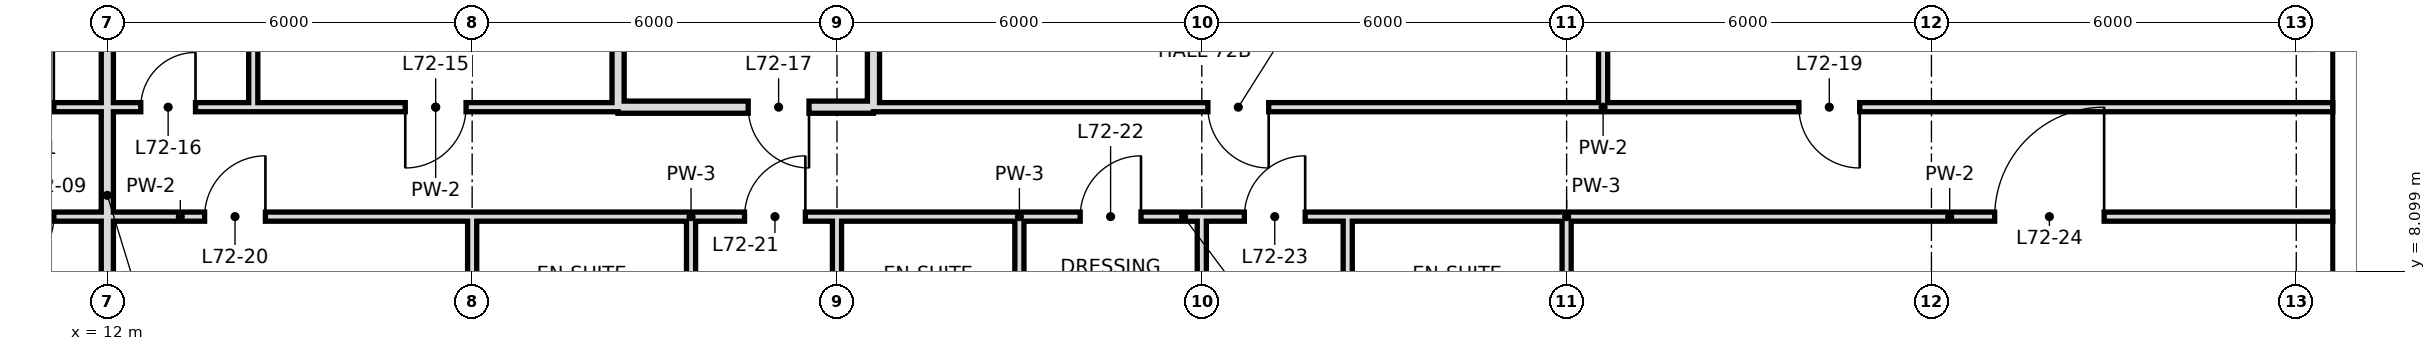
"""IFC4 building model, lengths in metres.
Left out: names, types, materials, properties, quantities, classifications, styles, units other than length and angle.
Written with IfcOpenShell. Run it as: python <this file> out.ifc"""

import sys

from ifc_helpers import new_model, si_unit, direction, frame, frame_2d, origin, place, context, subcontext, project, spatial, rectangle, extrude, element, fill, save


model = new_model("IFC4")
c1 = context("Model", 3, precision=1e-05, world=origin(), true_north=direction((0.0, 1.0)))
c2 = subcontext(c1, "Body", "Model", "MODEL_VIEW")
j1 = project(units=[si_unit("LENGTHUNIT", "METRE"), si_unit("PLANEANGLEUNIT", "RADIAN")], contexts=[c1])
p1 = place(None, origin())
s1 = spatial("IfcSite", under=j1, at=p1, CompositionType="ELEMENT")
p2 = place(p1, origin())
s2 = spatial("IfcBuilding", under=s1, at=p2, CompositionType="ELEMENT")
p3 = place(p2, frame((0.0, 0.0, 305.2)))
s3 = spatial("IfcBuildingStorey", under=s2, at=p3, CompositionType="ELEMENT", Elevation=305.2)
p4 = place(p3, frame((12.0, 0.0, 0.0), z_axis=(0.0, 0.0, 1.0), x_axis=(0.0, 1.0, 0.0)))
e1 = element("IfcWall", 1, at=p4, inside=s3, PredefinedType="SOLIDWALL", context=c2, shape_type="SweptSolid", body=[
    extrude(rectangle(XDim=18.7, YDim=0.2, at=frame_2d((9.35, 0.0))), origin(), (0.0, 0.0, 1.0), 2.72),
])
p5 = place(p3, frame((14.4, 10.8, 0.0), z_axis=(0.0, 0.0, 1.0), x_axis=(0.0, 1.0, 0.0)))
e2 = element("IfcWall", 2, at=p5, inside=s3, PredefinedType="PARTITIONING", context=c2, shape_type="SweptSolid", body=[
    extrude(rectangle(XDim=7.9, YDim=0.15, at=frame_2d((3.95, 0.0))), origin(), (0.0, 0.0, 1.0), 3.42),
])
p6 = place(p3, frame((18.0, 6.0, 0.0), z_axis=(0.0, 0.0, 1.0), x_axis=(0.0, 1.0, 0.0)))
e3 = element("IfcWall", 3, at=p6, inside=s3, PredefinedType="PARTITIONING", context=c2, shape_type="SweptSolid", body=[
    extrude(rectangle(XDim=3.0, YDim=0.15, at=frame_2d((1.5, 0.0))), origin(), (0.0, 0.0, 1.0), 2.72),
])
p7 = place(p3, frame((20.4, 10.8, 0.0), z_axis=(0.0, 0.0, 1.0), x_axis=(0.0, 1.0, 0.0)))
e4 = element("IfcWall", 4, at=p7, inside=s3, PredefinedType="SOLIDWALL", context=c2, shape_type="SweptSolid", body=[
    extrude(rectangle(XDim=7.9, YDim=0.2, at=frame_2d((3.95, 0.0))), origin(), (0.0, 0.0, 1.0), 2.72),
])
p8 = place(p3, frame((21.6, 6.0, 0.0), z_axis=(0.0, 0.0, 1.0), x_axis=(0.0, 1.0, 0.0)))
e5 = element("IfcWall", 5, at=p8, inside=s3, PredefinedType="PARTITIONING", context=c2, shape_type="SweptSolid", body=[
    extrude(rectangle(XDim=3.0, YDim=0.15, at=frame_2d((1.5, 0.0))), origin(), (0.0, 0.0, 1.0), 3.42),
])
p9 = place(p3, frame((24.0, 6.0, 0.0), z_axis=(0.0, 0.0, 1.0), x_axis=(0.0, 1.0, 0.0)))
e6 = element("IfcWall", 6, at=p9, inside=s3, PredefinedType="PARTITIONING", context=c2, shape_type="SweptSolid", body=[
    extrude(rectangle(XDim=3.0, YDim=0.15, at=frame_2d((1.5, 0.0))), origin(), (0.0, 0.0, 1.0), 2.72),
])
p10 = place(p3, frame((24.6, 10.8, 0.0), z_axis=(0.0, 0.0, 1.0), x_axis=(0.0, 1.0, 0.0)))
e7 = element("IfcWall", 7, at=p10, inside=s3, PredefinedType="SOLIDWALL", context=c2, shape_type="SweptSolid", body=[
    extrude(rectangle(XDim=7.9, YDim=0.2, at=frame_2d((3.95, 0.0))), origin(), (0.0, 0.0, 1.0), 2.72),
])
p11 = place(p3, frame((27.0, 6.0, 0.0), z_axis=(0.0, 0.0, 1.0), x_axis=(0.0, 1.0, 0.0)))
e8 = element("IfcWall", 8, at=p11, inside=s3, PredefinedType="PARTITIONING", context=c2, shape_type="SweptSolid", body=[
    extrude(rectangle(XDim=3.0, YDim=0.15, at=frame_2d((1.5, 0.0))), origin(), (0.0, 0.0, 1.0), 3.42),
])
p12 = place(p3, frame((30.0, -0.6, 0.0), z_axis=(0.0, 0.0, 1.0), x_axis=(0.0, 1.0, 0.0)))
e9 = element("IfcWall", 9, at=p12, inside=s3, PredefinedType="PARTITIONING", context=c2, shape_type="SweptSolid", body=[
    extrude(rectangle(XDim=9.6, YDim=0.15, at=frame_2d((4.8, 0.0))), origin(), (0.0, 0.0, 1.0), 2.72),
])
p13 = place(p3, frame((32.4, 6.0, 0.0), z_axis=(0.0, 0.0, 1.0), x_axis=(0.0, 1.0, 0.0)))
e10 = element("IfcWall", 10, at=p13, inside=s3, PredefinedType="PARTITIONING", context=c2, shape_type="SweptSolid", body=[
    extrude(rectangle(XDim=3.0, YDim=0.15, at=frame_2d((1.5, 0.0))), origin(), (0.0, 0.0, 1.0), 3.42),
])
p14 = place(p3, frame((36.0, 6.0, 0.0), z_axis=(0.0, 0.0, 1.0), x_axis=(0.0, 1.0, 0.0)))
e11 = element("IfcWall", 11, at=p14, inside=s3, PredefinedType="PARTITIONING", context=c2, shape_type="SweptSolid", body=[
    extrude(rectangle(XDim=3.0, YDim=0.15, at=frame_2d((1.5, 0.0))), origin(), (0.0, 0.0, 1.0), 2.72),
])
p15 = place(p3, frame((36.6, 10.8, 0.0), z_axis=(0.0, 0.0, 1.0), x_axis=(0.0, 1.0, 0.0)))
e12 = element("IfcWall", 12, at=p15, inside=s3, PredefinedType="PARTITIONING", context=c2, shape_type="SweptSolid", body=[
    extrude(rectangle(XDim=7.9, YDim=0.15, at=frame_2d((3.95, 0.0))), origin(), (0.0, 0.0, 1.0), 3.42),
])
p16 = place(p3, frame((20.4, 10.8, 0.0), z_axis=(0.0, 0.0, 1.0), x_axis=(1.0, 0.0, 0.0)))
e13 = element("IfcWall", 13, at=p16, inside=s3, PredefinedType="SOLIDWALL", context=c2, shape_type="SweptSolid", body=[
    extrude(rectangle(XDim=4.2, YDim=0.2, at=frame_2d((2.1, 0.0))), origin(), (0.0, 0.0, 1.0), 2.72),
])
p17 = place(p16, frame((2.14, 0.0, 0.0)))
e14 = element("IfcOpeningElement", 14, at=p17, cuts=e13, PredefinedType="OPENING", context=c2, shape_type="SweptSolid", body=[
    extrude(rectangle(XDim=1.0, YDim=2.4, at=frame_2d((0.5, 1.2))), frame((0.0, 0.11, 0.0), z_axis=(0.0, -1.0, 0.0), x_axis=(1.0, 0.0, 0.0)), (0.0, 0.0, 1.0), 0.22),
])
p18 = place(p3, frame((-10.2, 10.8, 0.0), z_axis=(0.0, 0.0, 1.0), x_axis=(1.0, 0.0, 0.0)))
e15 = element("IfcWall", 15, at=p18, inside=s3, PredefinedType="PARTITIONING", context=c2, shape_type="SweptSolid", body=[
    extrude(rectangle(XDim=22.2, YDim=0.15, at=frame_2d((11.1, 0.0))), origin(), (0.0, 0.0, 1.0), 3.42),
])
p19 = place(p18, frame((20.32, 0.0, 0.0)))
e16 = element("IfcOpeningElement", 16, at=p19, cuts=e15, PredefinedType="OPENING", context=c2, shape_type="SweptSolid", body=[
    extrude(rectangle(XDim=1.0, YDim=2.4, at=frame_2d((0.5, 1.2))), frame((0.0, 0.085, 0.0), z_axis=(0.0, -1.0, 0.0), x_axis=(1.0, 0.0, 0.0)), (0.0, 0.0, 1.0), 0.17),
])
p20 = place(p18, frame((3.4, 0.0, 0.0)))
e17 = element("IfcOpeningElement", 17, at=p20, cuts=e15, PredefinedType="OPENING", context=c2, shape_type="SweptSolid", body=[
    extrude(rectangle(XDim=1.0, YDim=2.4, at=frame_2d((0.5, 1.2))), frame((0.0, 0.085, 0.0), z_axis=(0.0, -1.0, 0.0), x_axis=(1.0, 0.0, 0.0)), (0.0, 0.0, 1.0), 0.17),
])
p21 = place(p18, frame((10.84, 0.0, 0.0)))
e18 = element("IfcOpeningElement", 18, at=p21, cuts=e15, PredefinedType="OPENING", context=c2, shape_type="SweptSolid", body=[
    extrude(rectangle(XDim=1.0, YDim=2.4, at=frame_2d((0.5, 1.2))), frame((0.0, 0.085, 0.0), z_axis=(0.0, -1.0, 0.0), x_axis=(1.0, 0.0, 0.0)), (0.0, 0.0, 1.0), 0.17),
])
p22 = place(p3, frame((14.4, 10.8, 0.0), z_axis=(0.0, 0.0, 1.0), x_axis=(1.0, 0.0, 0.0)))
e19 = element("IfcWall", 19, at=p22, inside=s3, PredefinedType="PARTITIONING", context=c2, shape_type="SweptSolid", body=[
    extrude(rectangle(XDim=6.0, YDim=0.15, at=frame_2d((3.0, 0.0))), origin(), (0.0, 0.0, 1.0), 3.42),
])
p23 = place(p22, frame((2.5, 0.0, 0.0)))
e20 = element("IfcOpeningElement", 20, at=p23, cuts=e19, PredefinedType="OPENING", context=c2, shape_type="SweptSolid", body=[
    extrude(rectangle(XDim=1.0, YDim=2.4, at=frame_2d((0.5, 1.2))), frame((0.0, 0.085, 0.0), z_axis=(0.0, -1.0, 0.0), x_axis=(1.0, 0.0, 0.0)), (0.0, 0.0, 1.0), 0.17),
])
p24 = place(p3, frame((24.6, 10.8, 0.0), z_axis=(0.0, 0.0, 1.0), x_axis=(1.0, 0.0, 0.0)))
e21 = element("IfcWall", 21, at=p24, inside=s3, PredefinedType="PARTITIONING", context=c2, shape_type="SweptSolid", body=[
    extrude(rectangle(XDim=24.0, YDim=0.15, at=frame_2d((12.0, 0.0))), origin(), (0.0, 0.0, 1.0), 3.42),
])
p25 = place(p24, frame((5.5, 0.0, 0.0)))
e22 = element("IfcOpeningElement", 22, at=p25, cuts=e21, PredefinedType="OPENING", context=c2, shape_type="SweptSolid", body=[
    extrude(rectangle(XDim=1.0, YDim=2.4, at=frame_2d((0.5, 1.2))), frame((0.0, 0.085, 0.0), z_axis=(0.0, -1.0, 0.0), x_axis=(1.0, 0.0, 0.0)), (0.0, 0.0, 1.0), 0.17),
])
p26 = place(p24, frame((15.22, 0.0, 0.0)))
e23 = element("IfcOpeningElement", 23, at=p26, cuts=e21, PredefinedType="OPENING", context=c2, shape_type="SweptSolid", body=[
    extrude(rectangle(XDim=1.0, YDim=2.4, at=frame_2d((0.5, 1.2))), frame((0.0, 0.085, 0.0), z_axis=(0.0, -1.0, 0.0), x_axis=(1.0, 0.0, 0.0)), (0.0, 0.0, 1.0), 0.17),
])
p27 = place(p3, frame((12.0, 10.8, 0.0), z_axis=(0.0, 0.0, 1.0), x_axis=(1.0, 0.0, 0.0)))
e24 = element("IfcWall", 24, at=p27, inside=s3, PredefinedType="PARTITIONING", context=c2, shape_type="SweptSolid", body=[
    extrude(rectangle(XDim=2.4, YDim=0.15, at=frame_2d((1.2, 0.0))), origin(), (0.0, 0.0, 1.0), 3.42),
])
p28 = place(p27, frame((0.55, 0.0, 0.0)))
e25 = element("IfcOpeningElement", 25, at=p28, cuts=e24, PredefinedType="OPENING", context=c2, shape_type="SweptSolid", body=[
    extrude(rectangle(XDim=0.9, YDim=2.4, at=frame_2d((0.45, 1.2))), frame((0.0, 0.085, 0.0), z_axis=(0.0, -1.0, 0.0), x_axis=(1.0, 0.0, 0.0)), (0.0, 0.0, 1.0), 0.17),
])
p29 = place(p3, frame((8.4, 9.0, 0.0), z_axis=(0.0, 0.0, 1.0), x_axis=(1.0, 0.0, 0.0)))
e26 = element("IfcWall", 26, at=p29, inside=s3, PredefinedType="PARTITIONING", context=c2, shape_type="SweptSolid", body=[
    extrude(rectangle(XDim=9.6, YDim=0.15, at=frame_2d((4.8, 0.0))), origin(), (0.0, 0.0, 1.0), 3.42),
])
p30 = place(p29, frame((1.72, 0.0, 0.0)))
e27 = element("IfcOpeningElement", 27, at=p30, cuts=e26, PredefinedType="OPENING", context=c2, shape_type="SweptSolid", body=[
    extrude(rectangle(XDim=1.0, YDim=2.4, at=frame_2d((0.5, 1.2))), frame((0.0, 0.085, 0.0), z_axis=(0.0, -1.0, 0.0), x_axis=(1.0, 0.0, 0.0)), (0.0, 0.0, 1.0), 0.17),
])
p31 = place(p29, frame((5.2, 0.0, 0.0)))
e28 = element("IfcOpeningElement", 28, at=p31, cuts=e26, PredefinedType="OPENING", context=c2, shape_type="SweptSolid", body=[
    extrude(rectangle(XDim=1.0, YDim=2.4, at=frame_2d((0.5, 1.2))), frame((0.0, 0.085, 0.0), z_axis=(0.0, -1.0, 0.0), x_axis=(1.0, 0.0, 0.0)), (0.0, 0.0, 1.0), 0.17),
])
p32 = place(p3, frame((21.6, 9.0, 0.0), z_axis=(0.0, 0.0, 1.0), x_axis=(1.0, 0.0, 0.0)))
e29 = element("IfcWall", 29, at=p32, inside=s3, PredefinedType="PARTITIONING", context=c2, shape_type="SweptSolid", body=[
    extrude(rectangle(XDim=2.4, YDim=0.15, at=frame_2d((1.2, 0.0))), origin(), (0.0, 0.0, 1.0), 3.42),
])
p33 = place(p32, frame((0.88, 0.0, 0.0)))
e30 = element("IfcOpeningElement", 30, at=p33, cuts=e29, PredefinedType="OPENING", context=c2, shape_type="SweptSolid", body=[
    extrude(rectangle(XDim=1.0, YDim=2.4, at=frame_2d((0.5, 1.2))), frame((0.0, 0.085, 0.0), z_axis=(0.0, -1.0, 0.0), x_axis=(1.0, 0.0, 0.0)), (0.0, 0.0, 1.0), 0.17),
])
p34 = place(p3, frame((27.0, 9.0, 0.0), z_axis=(0.0, 0.0, 1.0), x_axis=(1.0, 0.0, 0.0)))
e31 = element("IfcWall", 31, at=p34, inside=s3, PredefinedType="PARTITIONING", context=c2, shape_type="SweptSolid", body=[
    extrude(rectangle(XDim=5.4, YDim=0.15, at=frame_2d((2.7, 0.0))), origin(), (0.0, 0.0, 1.0), 3.42),
])
p35 = place(p34, frame((1.0, 0.0, 0.0)))
e32 = element("IfcOpeningElement", 32, at=p35, cuts=e31, PredefinedType="OPENING", context=c2, shape_type="SweptSolid", body=[
    extrude(rectangle(XDim=1.0, YDim=2.4, at=frame_2d((0.5, 1.2))), frame((0.0, 0.085, 0.0), z_axis=(0.0, -1.0, 0.0), x_axis=(1.0, 0.0, 0.0)), (0.0, 0.0, 1.0), 0.17),
])
p36 = place(p34, frame((3.7, 0.0, 0.0)))
e33 = element("IfcOpeningElement", 33, at=p36, cuts=e31, PredefinedType="OPENING", context=c2, shape_type="SweptSolid", body=[
    extrude(rectangle(XDim=1.0, YDim=2.4, at=frame_2d((0.5, 1.2))), frame((0.0, 0.085, 0.0), z_axis=(0.0, -1.0, 0.0), x_axis=(1.0, 0.0, 0.0)), (0.0, 0.0, 1.0), 0.17),
])
p37 = place(p3, frame((36.0, 9.0, 0.0), z_axis=(0.0, 0.0, 1.0), x_axis=(1.0, 0.0, 0.0)))
e34 = element("IfcWall", 34, at=p37, inside=s3, PredefinedType="PARTITIONING", context=c2, shape_type="SweptSolid", body=[
    extrude(rectangle(XDim=12.6, YDim=0.15, at=frame_2d((6.3, 0.0))), origin(), (0.0, 0.0, 1.0), 3.42),
])
p38 = place(p37, frame((7.04, 0.0, 0.0)))
e35 = element("IfcOpeningElement", 35, at=p38, cuts=e34, PredefinedType="OPENING", context=c2, shape_type="SweptSolid", body=[
    extrude(rectangle(XDim=1.8, YDim=2.4, at=frame_2d((0.9, 1.2))), frame((0.0, 0.085, 0.0), z_axis=(0.0, -1.0, 0.0), x_axis=(1.0, 0.0, 0.0)), (0.0, 0.0, 1.0), 0.17),
])
p39 = place(p3, frame((18.0, 9.0, 0.0), z_axis=(0.0, 0.0, 1.0), x_axis=(1.0, 0.0, 0.0)))
e36 = element("IfcWall", 36, at=p39, inside=s3, PredefinedType="PARTITIONING", context=c2, shape_type="SweptSolid", body=[
    extrude(rectangle(XDim=3.6, YDim=0.15, at=frame_2d((1.8, 0.0))), origin(), (0.0, 0.0, 1.0), 3.42),
])
p40 = place(p3, frame((24.0, 9.0, 0.0), z_axis=(0.0, 0.0, 1.0), x_axis=(1.0, 0.0, 0.0)))
e37 = element("IfcWall", 37, at=p40, inside=s3, PredefinedType="PARTITIONING", context=c2, shape_type="SweptSolid", body=[
    extrude(rectangle(XDim=3.0, YDim=0.15, at=frame_2d((1.5, 0.0))), origin(), (0.0, 0.0, 1.0), 3.42),
])
p41 = place(p3, frame((32.4, 9.0, 0.0), z_axis=(0.0, 0.0, 1.0), x_axis=(1.0, 0.0, 0.0)))
e38 = element("IfcWall", 38, at=p41, inside=s3, PredefinedType="PARTITIONING", context=c2, shape_type="SweptSolid", body=[
    extrude(rectangle(XDim=3.6, YDim=0.15, at=frame_2d((1.8, 0.0))), origin(), (0.0, 0.0, 1.0), 3.42),
])
p42 = place(p19, frame((1.0, 0.0, 0.0), z_axis=(0.0, 0.0, 1.0), x_axis=(-1.0, 0.0, 0.0)))
e39 = element("IfcDoor", 39, at=p42, inside=s3, OperationType="SINGLE_SWING_LEFT", PredefinedType="DOOR", context=c2, shape_type="SweptSolid", body=[
    extrude(rectangle(XDim=1.0, YDim=2.4, at=frame_2d((0.5, 1.2))), frame((0.0, 0.025, 0.0), z_axis=(0.0, -1.0, 0.0), x_axis=(1.0, 0.0, 0.0)), (0.0, 0.0, 1.0), 0.05),
])
fill(e16, e39)
p43 = place(p30, frame((1.0, 0.0, 0.0), z_axis=(0.0, 0.0, 1.0), x_axis=(-1.0, 0.0, 0.0)))
e40 = element("IfcDoor", 40, at=p43, inside=s3, OperationType="SINGLE_SWING_RIGHT", PredefinedType="DOOR", context=c2, shape_type="SweptSolid", body=[
    extrude(rectangle(XDim=1.0, YDim=2.4, at=frame_2d((0.5, 1.2))), frame((0.0, 0.025, 0.0), z_axis=(0.0, -1.0, 0.0), x_axis=(1.0, 0.0, 0.0)), (0.0, 0.0, 1.0), 0.05),
])
fill(e27, e40)
p44 = place(p23, frame((1.0, 0.0, 0.0), z_axis=(0.0, 0.0, 1.0), x_axis=(-1.0, 0.0, 0.0)))
e41 = element("IfcDoor", 41, at=p44, inside=s3, OperationType="SINGLE_SWING_RIGHT", PredefinedType="DOOR", context=c2, shape_type="SweptSolid", body=[
    extrude(rectangle(XDim=1.0, YDim=2.4, at=frame_2d((0.5, 1.2))), frame((0.0, 0.025, 0.0), z_axis=(0.0, -1.0, 0.0), x_axis=(1.0, 0.0, 0.0)), (0.0, 0.0, 1.0), 0.05),
])
fill(e20, e41)
p45 = place(p28, frame((0.9, 0.0, 0.0), z_axis=(0.0, 0.0, 1.0), x_axis=(-1.0, 0.0, 0.0)))
e42 = element("IfcDoor", 42, at=p45, inside=s3, OperationType="SINGLE_SWING_LEFT", PredefinedType="DOOR", context=c2, shape_type="SweptSolid", body=[
    extrude(rectangle(XDim=0.9, YDim=2.4, at=frame_2d((0.45, 1.2))), frame((0.0, 0.025, 0.0), z_axis=(0.0, -1.0, 0.0), x_axis=(1.0, 0.0, 0.0)), (0.0, 0.0, 1.0), 0.05),
])
fill(e25, e42)
p46 = place(p17, origin())
e43 = element("IfcDoor", 43, at=p46, inside=s3, OperationType="SINGLE_SWING_RIGHT", PredefinedType="DOOR", context=c2, shape_type="SweptSolid", body=[
    extrude(rectangle(XDim=1.0, YDim=2.4, at=frame_2d((0.5, 1.2))), frame((0.0, 0.025, 0.0), z_axis=(0.0, -1.0, 0.0), x_axis=(1.0, 0.0, 0.0)), (0.0, 0.0, 1.0), 0.05),
])
fill(e14, e43)
p47 = place(p25, origin())
e44 = element("IfcDoor", 44, at=p47, inside=s3, OperationType="SINGLE_SWING_RIGHT", PredefinedType="DOOR", context=c2, shape_type="SweptSolid", body=[
    extrude(rectangle(XDim=1.0, YDim=2.4, at=frame_2d((0.5, 1.2))), frame((0.0, 0.025, 0.0), z_axis=(0.0, -1.0, 0.0), x_axis=(1.0, 0.0, 0.0)), (0.0, 0.0, 1.0), 0.05),
])
fill(e22, e44)
p48 = place(p26, origin())
e45 = element("IfcDoor", 45, at=p48, inside=s3, OperationType="SINGLE_SWING_RIGHT", PredefinedType="DOOR", context=c2, shape_type="SweptSolid", body=[
    extrude(rectangle(XDim=1.0, YDim=2.4, at=frame_2d((0.5, 1.2))), frame((0.0, 0.025, 0.0), z_axis=(0.0, -1.0, 0.0), x_axis=(1.0, 0.0, 0.0)), (0.0, 0.0, 1.0), 0.05),
])
fill(e23, e45)
p49 = place(p31, frame((1.0, 0.0, 0.0), z_axis=(0.0, 0.0, 1.0), x_axis=(-1.0, 0.0, 0.0)))
e46 = element("IfcDoor", 46, at=p49, inside=s3, OperationType="SINGLE_SWING_LEFT", PredefinedType="DOOR", context=c2, shape_type="SweptSolid", body=[
    extrude(rectangle(XDim=1.0, YDim=2.4, at=frame_2d((0.5, 1.2))), frame((0.0, 0.025, 0.0), z_axis=(0.0, -1.0, 0.0), x_axis=(1.0, 0.0, 0.0)), (0.0, 0.0, 1.0), 0.05),
])
fill(e28, e46)
p50 = place(p33, frame((1.0, 0.0, 0.0), z_axis=(0.0, 0.0, 1.0), x_axis=(-1.0, 0.0, 0.0)))
e47 = element("IfcDoor", 47, at=p50, inside=s3, OperationType="SINGLE_SWING_LEFT", PredefinedType="DOOR", context=c2, shape_type="SweptSolid", body=[
    extrude(rectangle(XDim=1.0, YDim=2.4, at=frame_2d((0.5, 1.2))), frame((0.0, 0.025, 0.0), z_axis=(0.0, -1.0, 0.0), x_axis=(1.0, 0.0, 0.0)), (0.0, 0.0, 1.0), 0.05),
])
fill(e30, e47)
p51 = place(p35, frame((1.0, 0.0, 0.0), z_axis=(0.0, 0.0, 1.0), x_axis=(-1.0, 0.0, 0.0)))
e48 = element("IfcDoor", 48, at=p51, inside=s3, OperationType="SINGLE_SWING_LEFT", PredefinedType="DOOR", context=c2, shape_type="SweptSolid", body=[
    extrude(rectangle(XDim=1.0, YDim=2.4, at=frame_2d((0.5, 1.2))), frame((0.0, 0.025, 0.0), z_axis=(0.0, -1.0, 0.0), x_axis=(1.0, 0.0, 0.0)), (0.0, 0.0, 1.0), 0.05),
])
fill(e32, e48)
p52 = place(p36, frame((1.0, 0.0, 0.0), z_axis=(0.0, 0.0, 1.0), x_axis=(-1.0, 0.0, 0.0)))
e49 = element("IfcDoor", 49, at=p52, inside=s3, OperationType="SINGLE_SWING_LEFT", PredefinedType="DOOR", context=c2, shape_type="SweptSolid", body=[
    extrude(rectangle(XDim=1.0, YDim=2.4, at=frame_2d((0.5, 1.2))), frame((0.0, 0.025, 0.0), z_axis=(0.0, -1.0, 0.0), x_axis=(1.0, 0.0, 0.0)), (0.0, 0.0, 1.0), 0.05),
])
fill(e33, e49)
p53 = place(p38, frame((1.8, 0.0, 0.0), z_axis=(0.0, 0.0, 1.0), x_axis=(-1.0, 0.0, 0.0)))
e50 = element("IfcDoor", 50, at=p53, inside=s3, OperationType="SINGLE_SWING_LEFT", PredefinedType="DOOR", context=c2, shape_type="SweptSolid", body=[
    extrude(rectangle(XDim=1.8, YDim=2.4, at=frame_2d((0.9, 1.2))), frame((0.0, 0.025, 0.0), z_axis=(0.0, -1.0, 0.0), x_axis=(1.0, 0.0, 0.0)), (0.0, 0.0, 1.0), 0.05),
])
fill(e35, e50)
save(model, sys.argv[1])
